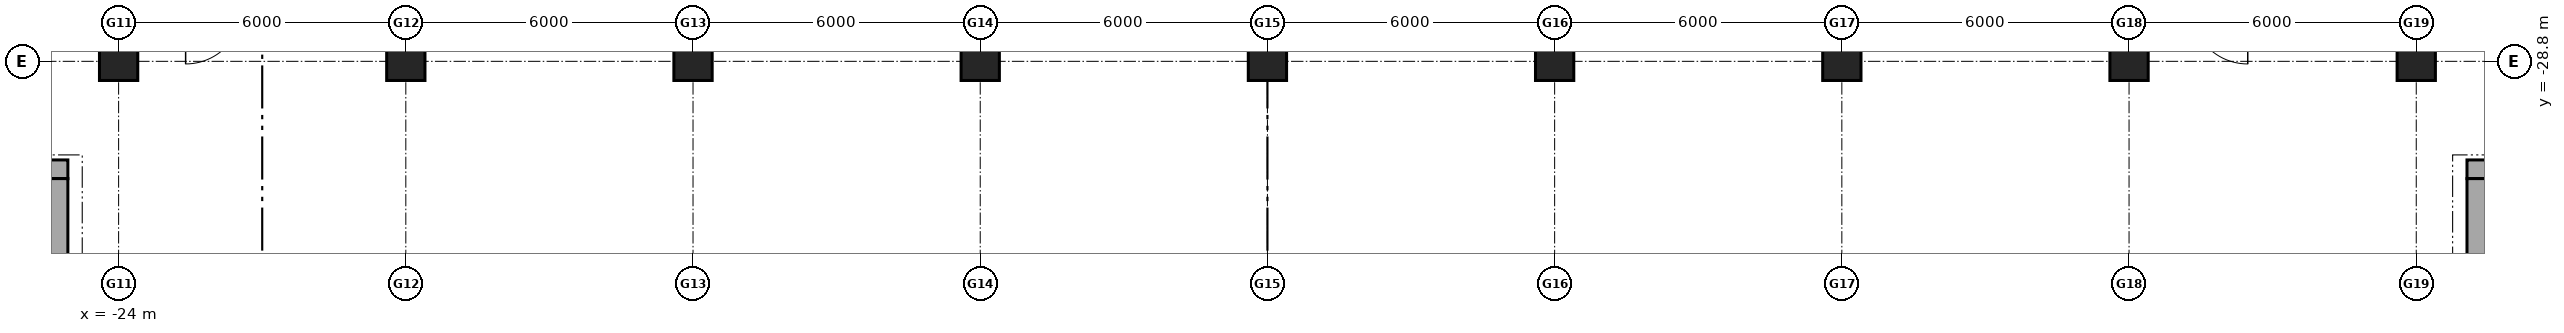
"""IFC4 building model, lengths in metres.
Left out: names, types, materials, properties, quantities, classifications, styles, units other than length and angle.
Written with IfcOpenShell. Run it as: python <this file> out.ifc"""

import sys

from ifc_helpers import new_model, si_unit, direction, frame, frame_2d, origin, origin_2d, place, context, subcontext, project, spatial, rectangle, extrude, element, save


model = new_model("IFC4")
c1 = context("Model", 3, precision=1e-05, world=origin(), true_north=direction((0.0, 1.0)))
c2 = subcontext(c1, "Body", "Model", "MODEL_VIEW")
j1 = project(units=[si_unit("LENGTHUNIT", "METRE"), si_unit("PLANEANGLEUNIT", "RADIAN")], contexts=[c1])
p1 = place(None, origin())
s1 = spatial("IfcSite", under=j1, at=p1, CompositionType="ELEMENT")
p2 = place(p1, origin())
s2 = spatial("IfcBuilding", under=s1, at=p2, CompositionType="ELEMENT")
p3 = place(p2, frame((0.0, 0.0, -5.4)))
s3 = spatial("IfcBuildingStorey", under=s2, at=p3, CompositionType="ELEMENT", Elevation=-5.4)
for number, where, z_axis, x_axis in (
    (1, (-24.0, -28.8, 0.0), (0.0, 0.0, 1.0), (1.0, 0.0, 0.0)),
    (2, (-18.0, -28.8, 0.0), (0.0, 0.0, 1.0), (1.0, 0.0, 0.0)),
    (3, (-12.0, -28.8, 0.0), (0.0, 0.0, 1.0), (1.0, 0.0, 0.0)),
    (4, (-6.0, -28.8, 0.0), (0.0, 0.0, 1.0), (1.0, 0.0, 0.0)),
    (5, (0.0, -28.8, 0.0), (0.0, 0.0, 1.0), (1.0, 0.0, 0.0)),
    (6, (6.0, -28.8, 0.0), (0.0, 0.0, 1.0), (1.0, 0.0, 0.0)),
    (7, (12.0, -28.8, 0.0), (0.0, 0.0, 1.0), (1.0, 0.0, 0.0)),
    (8, (18.0, -28.8, 0.0), (0.0, 0.0, 1.0), (1.0, 0.0, 0.0)),
    (9, (24.0, -28.8, 0.0), (0.0, 0.0, 1.0), (1.0, 0.0, 0.0)),
):
    element("IfcColumn", number, at=place(p3, frame(where, z_axis=z_axis, x_axis=x_axis)), inside=s3, PredefinedType="COLUMN", context=c2, shape_type="SweptSolid", body=[
        extrude(rectangle(XDim=0.8, YDim=0.8, at=origin_2d()), origin(), (0.0, 0.0, 1.0), 5.4),
    ])
p4 = place(p3, frame((-28.54, -31.055, 0.0), z_axis=(0.0, 0.0, 1.0), x_axis=(1.0, 0.0, 0.0)))
e10 = element("IfcWall", 10, at=p4, inside=s3, PredefinedType="SHEAR", context=c2, shape_type="SweptSolid", body=[
    extrude(rectangle(XDim=3.48, YDim=0.39, at=frame_2d((1.74, 0.0))), origin(), (0.0, 0.0, 1.0), 5.4),
])
p5 = place(p4, frame((1.19, 0.0, 0.0)))
e11 = element("IfcOpeningElement", 11, at=p5, cuts=e10, PredefinedType="OPENING", context=c2, shape_type="SweptSolid", body=[
    extrude(rectangle(XDim=1.1, YDim=2.15, at=frame_2d((0.55, 1.075))), frame((0.0, 0.205, 0.0), z_axis=(0.0, -1.0, 0.0), x_axis=(1.0, 0.0, 0.0)), (0.0, 0.0, 1.0), 0.41),
])
p6 = place(p3, frame((-25.255, -31.25, 0.0), z_axis=(0.0, 0.0, 1.0), x_axis=(0.0, -1.0, 0.0)))
e12 = element("IfcWall", 12, at=p6, inside=s3, PredefinedType="SHEAR", context=c2, shape_type="SweptSolid", body=[
    extrude(rectangle(XDim=2.3, YDim=0.39, at=frame_2d((1.15, 0.0))), origin(), (0.0, 0.0, 1.0), 5.4),
])
p7 = place(p3, frame((25.06, -31.055, 0.0), z_axis=(0.0, 0.0, 1.0), x_axis=(1.0, 0.0, 0.0)))
e13 = element("IfcWall", 13, at=p7, inside=s3, PredefinedType="SHEAR", context=c2, shape_type="SweptSolid", body=[
    extrude(rectangle(XDim=3.48, YDim=0.39, at=frame_2d((1.74, 0.0))), origin(), (0.0, 0.0, 1.0), 5.4),
])
p8 = place(p7, frame((1.19, 0.0, 0.0)))
e14 = element("IfcOpeningElement", 14, at=p8, cuts=e13, PredefinedType="OPENING", context=c2, shape_type="SweptSolid", body=[
    extrude(rectangle(XDim=1.1, YDim=2.15, at=frame_2d((0.55, 1.075))), frame((0.0, 0.205, 0.0), z_axis=(0.0, -1.0, 0.0), x_axis=(1.0, 0.0, 0.0)), (0.0, 0.0, 1.0), 0.41),
])
p9 = place(p3, frame((25.255, -33.55, 0.0), z_axis=(0.0, 0.0, 1.0), x_axis=(0.0, 1.0, 0.0)))
e15 = element("IfcWall", 15, at=p9, inside=s3, PredefinedType="SHEAR", context=c2, shape_type="SweptSolid", body=[
    extrude(rectangle(XDim=2.3, YDim=0.39, at=frame_2d((1.15, 0.0))), origin(), (0.0, 0.0, 1.0), 5.4),
])
save(model, sys.argv[1])
